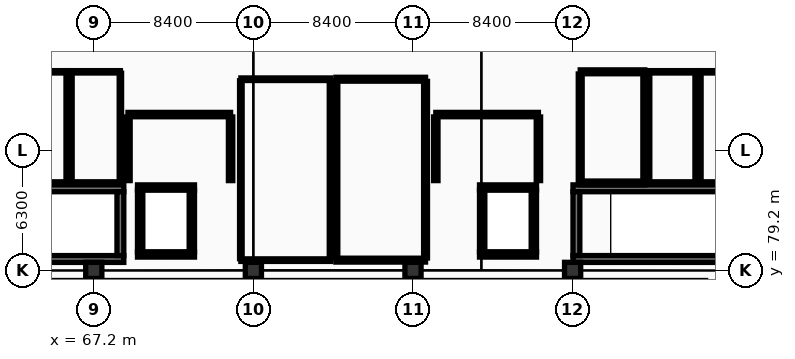
"""IFC4 building model, lengths in metres.
Left out: names, types, materials, properties, quantities, classifications, styles, units other than length and angle.
Written with IfcOpenShell. Run it as: python <this file> out.ifc"""

import sys

from ifc_helpers import new_model, si_unit, direction, frame, frame_2d, origin, origin_2d, place, context, subcontext, project, spatial, rectangle, extrude, element, fill, save


model = new_model("IFC4")
c1 = context("Model", 3, precision=1e-05, world=origin(), true_north=direction((0.0, 1.0)))
c2 = subcontext(c1, "Body", "Model", "MODEL_VIEW")
j1 = project(units=[si_unit("LENGTHUNIT", "METRE"), si_unit("PLANEANGLEUNIT", "RADIAN")], contexts=[c1])
p1 = place(None, origin())
s1 = spatial("IfcSite", under=j1, at=p1, CompositionType="ELEMENT")
p2 = place(p1, origin())
s2 = spatial("IfcBuilding", under=s1, at=p2, CompositionType="ELEMENT")
p3 = place(p2, origin())
s3 = spatial("IfcBuildingStorey", under=s2, at=p3, CompositionType="ELEMENT", Elevation=0.0)
for number, where, z_axis, x_axis in (
    (1, (67.2, 79.2, 0.0), (0.0, 0.0, 1.0), (1.0, 0.0, 0.0)),
    (2, (75.6, 79.2, 0.0), (0.0, 0.0, 1.0), (1.0, 0.0, 0.0)),
    (3, (84.0, 79.2, 0.0), (0.0, 0.0, 1.0), (1.0, 0.0, 0.0)),
    (4, (92.4, 79.2, 0.0), (0.0, 0.0, 1.0), (1.0, 0.0, 0.0)),
):
    element("IfcColumn", number, at=place(p3, frame(where, z_axis=z_axis, x_axis=x_axis)), inside=s3, PredefinedType="COLUMN", context=c2, shape_type="SweptSolid", body=[
        extrude(rectangle(XDim=0.85, YDim=0.85, at=origin_2d()), origin(), (0.0, 0.0, 1.0), 5.4),
    ])
for number, where, z_axis, x_axis in (
    (5, (59.42, 83.52, 0.0), (0.0, 0.0, 1.0), (1.0, 0.0, 0.0)),
    (6, (68.78, 79.8, 0.0), (0.0, 0.0, 1.0), (-1.0, 0.0, 0.0)),
):
    element("IfcWall", number, at=place(p3, frame(where, z_axis=z_axis, x_axis=x_axis)), inside=s3, PredefinedType="SHEAR", context=c2, shape_type="SweptSolid", body=[
        extrude(rectangle(XDim=9.36, YDim=0.36, at=frame_2d((4.68, 0.0))), origin(), (0.0, 0.0, 1.0), 5.14),
    ])
p4 = place(p3, frame((68.6, 83.34, 0.0), z_axis=(0.0, 0.0, 1.0), x_axis=(0.0, -1.0, 0.0)))
e7 = element("IfcWall", 7, at=p4, inside=s3, PredefinedType="SHEAR", context=c2, shape_type="SweptSolid", body=[
    extrude(rectangle(XDim=3.36, YDim=0.36, at=frame_2d((1.68, 0.0))), origin(), (0.0, 0.0, 1.0), 5.14),
])
for number, where, z_axis, x_axis in (
    (8, (92.42, 83.52, 0.0), (0.0, 0.0, 1.0), (1.0, 0.0, 0.0)),
    (9, (101.78, 79.8, 0.0), (0.0, 0.0, 1.0), (-1.0, 0.0, 0.0)),
):
    element("IfcWall", number, at=place(p3, frame(where, z_axis=z_axis, x_axis=x_axis)), inside=s3, PredefinedType="SHEAR", context=c2, shape_type="SweptSolid", body=[
        extrude(rectangle(XDim=9.36, YDim=0.36, at=frame_2d((4.68, 0.0))), origin(), (0.0, 0.0, 1.0), 5.14),
    ])
p5 = place(p3, frame((92.6, 79.98, 0.0), z_axis=(0.0, 0.0, 1.0), x_axis=(0.0, 1.0, 0.0)))
e10 = element("IfcWall", 10, at=p5, inside=s3, PredefinedType="SHEAR", context=c2, shape_type="SweptSolid", body=[
    extrude(rectangle(XDim=3.36, YDim=0.36, at=frame_2d((1.68, 0.0))), origin(), (0.0, 0.0, 1.0), 5.14),
])
p6 = place(p5, frame((1.08, 0.0, 0.0)))
e11 = element("IfcOpeningElement", 11, at=p6, cuts=e10, PredefinedType="OPENING", context=c2, shape_type="SweptSolid", body=[
    extrude(rectangle(XDim=1.2, YDim=2.2, at=frame_2d((0.6, 1.1))), frame((0.0, 0.19, 0.0), z_axis=(0.0, -1.0, 0.0), x_axis=(1.0, 0.0, 0.0)), (0.0, 0.0, 1.0), 0.38),
])
p7 = place(p3, frame((69.5, 83.56, 0.0), z_axis=(0.0, 0.0, 1.0), x_axis=(1.0, 0.0, 0.0)))
e12 = element("IfcWall", 12, at=p7, inside=s3, PredefinedType="SHEAR", context=c2, shape_type="SweptSolid", body=[
    extrude(rectangle(XDim=3.0, YDim=0.28, at=frame_2d((1.5, 0.0))), origin(), (0.0, 0.0, 1.0), 5.14),
])
p8 = place(p7, frame((0.95, 0.0, 0.0)))
e13 = element("IfcOpeningElement", 13, at=p8, cuts=e12, PredefinedType="OPENING", context=c2, shape_type="SweptSolid", body=[
    extrude(rectangle(XDim=1.1, YDim=2.2, at=frame_2d((0.55, 1.1))), frame((0.0, 0.15, 0.0), z_axis=(0.0, -1.0, 0.0), x_axis=(1.0, 0.0, 0.0)), (0.0, 0.0, 1.0), 0.3),
])
p9 = place(p3, frame((72.5, 80.04, 0.0), z_axis=(0.0, 0.0, 1.0), x_axis=(-1.0, 0.0, 0.0)))
e14 = element("IfcWall", 14, at=p9, inside=s3, PredefinedType="SHEAR", context=c2, shape_type="SweptSolid", body=[
    extrude(rectangle(XDim=3.0, YDim=0.28, at=frame_2d((1.5, 0.0))), origin(), (0.0, 0.0, 1.0), 5.14),
])
for number, where, z_axis, x_axis in (
    (15, (69.64, 80.18, 0.0), (0.0, 0.0, 1.0), (0.0, 1.0, 0.0)),
    (16, (72.36, 83.42, 0.0), (0.0, 0.0, 1.0), (0.0, -1.0, 0.0)),
):
    element("IfcWall", number, at=place(p3, frame(where, z_axis=z_axis, x_axis=x_axis)), inside=s3, PredefinedType="SHEAR", context=c2, shape_type="SweptSolid", body=[
        extrude(rectangle(XDim=3.24, YDim=0.28, at=frame_2d((1.62, 0.0))), origin(), (0.0, 0.0, 1.0), 5.14),
    ])
p10 = place(p3, frame((87.5, 83.56, 0.0), z_axis=(0.0, 0.0, 1.0), x_axis=(1.0, 0.0, 0.0)))
e17 = element("IfcWall", 17, at=p10, inside=s3, PredefinedType="SHEAR", context=c2, shape_type="SweptSolid", body=[
    extrude(rectangle(XDim=3.0, YDim=0.28, at=frame_2d((1.5, 0.0))), origin(), (0.0, 0.0, 1.0), 5.14),
])
p11 = place(p10, frame((0.95, 0.0, 0.0)))
e18 = element("IfcOpeningElement", 18, at=p11, cuts=e17, PredefinedType="OPENING", context=c2, shape_type="SweptSolid", body=[
    extrude(rectangle(XDim=1.1, YDim=2.2, at=frame_2d((0.55, 1.1))), frame((0.0, 0.15, 0.0), z_axis=(0.0, -1.0, 0.0), x_axis=(1.0, 0.0, 0.0)), (0.0, 0.0, 1.0), 0.3),
])
p12 = place(p3, frame((90.5, 80.04, 0.0), z_axis=(0.0, 0.0, 1.0), x_axis=(-1.0, 0.0, 0.0)))
e19 = element("IfcWall", 19, at=p12, inside=s3, PredefinedType="SHEAR", context=c2, shape_type="SweptSolid", body=[
    extrude(rectangle(XDim=3.0, YDim=0.28, at=frame_2d((1.5, 0.0))), origin(), (0.0, 0.0, 1.0), 5.14),
])
for number, where, z_axis, x_axis in (
    (20, (87.64, 80.18, 0.0), (0.0, 0.0, 1.0), (0.0, 1.0, 0.0)),
    (21, (90.36, 83.42, 0.0), (0.0, 0.0, 1.0), (0.0, -1.0, 0.0)),
):
    element("IfcWall", number, at=place(p3, frame(where, z_axis=z_axis, x_axis=x_axis)), inside=s3, PredefinedType="SHEAR", context=c2, shape_type="SweptSolid", body=[
        extrude(rectangle(XDim=3.24, YDim=0.28, at=frame_2d((1.62, 0.0))), origin(), (0.0, 0.0, 1.0), 5.14),
    ])
p13 = place(p3, frame((69.0, 87.4, 0.0), z_axis=(0.0, 0.0, 1.0), x_axis=(1.0, 0.0, 0.0)))
e22 = element("IfcWall", 22, at=p13, inside=s3, PredefinedType="STANDARD", context=c2, shape_type="SweptSolid", body=[
    extrude(rectangle(XDim=5.4, YDim=0.23, at=frame_2d((2.7, 0.0))), origin(), (0.0, 0.0, 1.0), 5.125),
])
p14 = place(p13, frame((2.05, 0.0, 0.0)))
e23 = element("IfcOpeningElement", 23, at=p14, cuts=e22, PredefinedType="OPENING", context=c2, shape_type="SweptSolid", body=[
    extrude(rectangle(XDim=1.3, YDim=2.2, at=frame_2d((0.65, 1.1))), frame((0.0, 0.125, 0.0), z_axis=(0.0, -1.0, 0.0), x_axis=(1.0, 0.0, 0.0)), (0.0, 0.0, 1.0), 0.25),
])
for number, where, z_axis, x_axis in (
    (24, (69.0, 83.925, 0.0), (0.0, 0.0, 1.0), (0.0, 1.0, 0.0)),
    (25, (74.4, 87.275, 0.0), (0.0, 0.0, 1.0), (0.0, -1.0, 0.0)),
):
    element("IfcWall", number, at=place(p3, frame(where, z_axis=z_axis, x_axis=x_axis)), inside=s3, PredefinedType="STANDARD", context=c2, shape_type="SweptSolid", body=[
        extrude(rectangle(XDim=3.35, YDim=0.23, at=frame_2d((1.675, 0.0))), origin(), (0.0, 0.0, 1.0), 5.125),
    ])
p15 = place(p3, frame((85.2, 87.4, 0.0), z_axis=(0.0, 0.0, 1.0), x_axis=(1.0, 0.0, 0.0)))
e26 = element("IfcWall", 26, at=p15, inside=s3, PredefinedType="STANDARD", context=c2, shape_type="SweptSolid", body=[
    extrude(rectangle(XDim=5.4, YDim=0.23, at=frame_2d((2.7, 0.0))), origin(), (0.0, 0.0, 1.0), 4.52),
])
p16 = place(p15, frame((2.05, 0.0, 0.0)))
e27 = element("IfcOpeningElement", 27, at=p16, cuts=e26, PredefinedType="OPENING", context=c2, shape_type="SweptSolid", body=[
    extrude(rectangle(XDim=1.3, YDim=2.2, at=frame_2d((0.65, 1.1))), frame((0.0, 0.125, 0.0), z_axis=(0.0, -1.0, 0.0), x_axis=(1.0, 0.0, 0.0)), (0.0, 0.0, 1.0), 0.25),
])
for number, where, z_axis, x_axis in (
    (28, (85.2, 83.925, 0.0), (0.0, 0.0, 1.0), (0.0, 1.0, 0.0)),
    (29, (90.6, 87.275, 0.0), (0.0, 0.0, 1.0), (0.0, -1.0, 0.0)),
):
    element("IfcWall", number, at=place(p3, frame(where, z_axis=z_axis, x_axis=x_axis)), inside=s3, PredefinedType="STANDARD", context=c2, shape_type="SweptSolid", body=[
        extrude(rectangle(XDim=3.35, YDim=0.23, at=frame_2d((1.675, 0.0))), origin(), (0.0, 0.0, 1.0), 4.52),
    ])
p17 = place(p3, frame((63.2, 89.65, 0.0), z_axis=(0.0, 0.0, 1.0), x_axis=(1.0, 0.0, 0.0)))
e30 = element("IfcWall", 30, at=p17, inside=s3, PredefinedType="PARTITIONING", context=c2, shape_type="SweptSolid", body=[
    extrude(rectangle(XDim=2.6, YDim=0.125, at=frame_2d((1.3, 0.0))), origin(), (0.0, 0.0, 1.0), 5.125),
])
p18 = place(p17, frame((0.85, 0.0, 0.0)))
e31 = element("IfcOpeningElement", 31, at=p18, cuts=e30, PredefinedType="OPENING", context=c2, shape_type="SweptSolid", body=[
    extrude(rectangle(XDim=0.9, YDim=2.1, at=frame_2d((0.45, 1.05))), frame((0.0, 0.073, 0.0), z_axis=(0.0, -1.0, 0.0), x_axis=(1.0, 0.0, 0.0)), (0.0, 0.0, 1.0), 0.145),
])
p19 = place(p3, frame((65.8, 83.8, 0.0), z_axis=(0.0, 0.0, 1.0), x_axis=(-1.0, 0.0, 0.0)))
e32 = element("IfcWall", 32, at=p19, inside=s3, PredefinedType="PARTITIONING", context=c2, shape_type="SweptSolid", body=[
    extrude(rectangle(XDim=2.6, YDim=0.125, at=frame_2d((1.3, 0.0))), origin(), (0.0, 0.0, 1.0), 5.125),
])
p20 = place(p3, frame((65.8, 89.577, 0.0), z_axis=(0.0, 0.0, 1.0), x_axis=(0.0, -1.0, 0.0)))
e33 = element("IfcWall", 33, at=p20, inside=s3, PredefinedType="PARTITIONING", context=c2, shape_type="SweptSolid", body=[
    extrude(rectangle(XDim=5.705, YDim=0.125, at=frame_2d((2.853, 0.0))), origin(), (0.0, 0.0, 1.0), 5.125),
])
p21 = place(p3, frame((66.0, 89.65, 0.0), z_axis=(0.0, 0.0, 1.0), x_axis=(1.0, 0.0, 0.0)))
e34 = element("IfcWall", 34, at=p21, inside=s3, PredefinedType="PARTITIONING", context=c2, shape_type="SweptSolid", body=[
    extrude(rectangle(XDim=2.6, YDim=0.125, at=frame_2d((1.3, 0.0))), origin(), (0.0, 0.0, 1.0), 4.27),
])
p22 = place(p21, frame((0.8, 0.0, 0.0)))
e35 = element("IfcOpeningElement", 35, at=p22, cuts=e34, PredefinedType="OPENING", context=c2, shape_type="SweptSolid", body=[
    extrude(rectangle(XDim=1.0, YDim=2.1, at=frame_2d((0.5, 1.05))), frame((0.0, 0.073, 0.0), z_axis=(0.0, -1.0, 0.0), x_axis=(1.0, 0.0, 0.0)), (0.0, 0.0, 1.0), 0.145),
])
p23 = place(p3, frame((68.6, 83.8, 0.0), z_axis=(0.0, 0.0, 1.0), x_axis=(-1.0, 0.0, 0.0)))
e36 = element("IfcWall", 36, at=p23, inside=s3, PredefinedType="PARTITIONING", context=c2, shape_type="SweptSolid", body=[
    extrude(rectangle(XDim=2.6, YDim=0.125, at=frame_2d((1.3, 0.0))), origin(), (0.0, 0.0, 1.0), 4.27),
])
for number, where, z_axis, x_axis in (
    (37, (66.0, 83.873, 0.0), (0.0, 0.0, 1.0), (0.0, 1.0, 0.0)),
    (38, (68.6, 89.577, 0.0), (0.0, 0.0, 1.0), (0.0, -1.0, 0.0)),
):
    element("IfcWall", number, at=place(p3, frame(where, z_axis=z_axis, x_axis=x_axis)), inside=s3, PredefinedType="PARTITIONING", context=c2, shape_type="SweptSolid", body=[
        extrude(rectangle(XDim=5.705, YDim=0.125, at=frame_2d((2.853, 0.0))), origin(), (0.0, 0.0, 1.0), 5.125),
    ])
p24 = place(p3, frame((96.4, 89.65, 0.0), z_axis=(0.0, 0.0, 1.0), x_axis=(1.0, 0.0, 0.0)))
e39 = element("IfcWall", 39, at=p24, inside=s3, PredefinedType="PARTITIONING", context=c2, shape_type="SweptSolid", body=[
    extrude(rectangle(XDim=2.5, YDim=0.125, at=frame_2d((1.25, 0.0))), origin(), (0.0, 0.0, 1.0), 5.125),
])
p25 = place(p24, frame((0.8, 0.0, 0.0)))
e40 = element("IfcOpeningElement", 40, at=p25, cuts=e39, PredefinedType="OPENING", context=c2, shape_type="SweptSolid", body=[
    extrude(rectangle(XDim=0.9, YDim=2.1, at=frame_2d((0.45, 1.05))), frame((0.0, 0.073, 0.0), z_axis=(0.0, -1.0, 0.0), x_axis=(1.0, 0.0, 0.0)), (0.0, 0.0, 1.0), 0.145),
])
p26 = place(p3, frame((98.9, 83.8, 0.0), z_axis=(0.0, 0.0, 1.0), x_axis=(-1.0, 0.0, 0.0)))
e41 = element("IfcWall", 41, at=p26, inside=s3, PredefinedType="PARTITIONING", context=c2, shape_type="SweptSolid", body=[
    extrude(rectangle(XDim=2.5, YDim=0.125, at=frame_2d((1.25, 0.0))), origin(), (0.0, 0.0, 1.0), 5.125),
])
for number, where, z_axis, x_axis in (
    (42, (96.4, 83.873, 0.0), (0.0, 0.0, 1.0), (0.0, 1.0, 0.0)),
    (43, (98.9, 89.577, 0.0), (0.0, 0.0, 1.0), (0.0, -1.0, 0.0)),
):
    element("IfcWall", number, at=place(p3, frame(where, z_axis=z_axis, x_axis=x_axis)), inside=s3, PredefinedType="PARTITIONING", context=c2, shape_type="SweptSolid", body=[
        extrude(rectangle(XDim=5.705, YDim=0.125, at=frame_2d((2.853, 0.0))), origin(), (0.0, 0.0, 1.0), 4.52),
    ])
p27 = place(p3, frame((99.1, 89.65, 0.0), z_axis=(0.0, 0.0, 1.0), x_axis=(1.0, 0.0, 0.0)))
e44 = element("IfcWall", 44, at=p27, inside=s3, PredefinedType="PARTITIONING", context=c2, shape_type="SweptSolid", body=[
    extrude(rectangle(XDim=2.5, YDim=0.125, at=frame_2d((1.25, 0.0))), origin(), (0.0, 0.0, 1.0), 4.27),
])
p28 = place(p27, frame((0.75, 0.0, 0.0)))
e45 = element("IfcOpeningElement", 45, at=p28, cuts=e44, PredefinedType="OPENING", context=c2, shape_type="SweptSolid", body=[
    extrude(rectangle(XDim=1.0, YDim=2.1, at=frame_2d((0.5, 1.05))), frame((0.0, 0.073, 0.0), z_axis=(0.0, -1.0, 0.0), x_axis=(1.0, 0.0, 0.0)), (0.0, 0.0, 1.0), 0.145),
])
p29 = place(p3, frame((101.6, 83.8, 0.0), z_axis=(0.0, 0.0, 1.0), x_axis=(-1.0, 0.0, 0.0)))
e46 = element("IfcWall", 46, at=p29, inside=s3, PredefinedType="PARTITIONING", context=c2, shape_type="SweptSolid", body=[
    extrude(rectangle(XDim=2.5, YDim=0.125, at=frame_2d((1.25, 0.0))), origin(), (0.0, 0.0, 1.0), 4.27),
])
p30 = place(p3, frame((99.1, 83.873, 0.0), z_axis=(0.0, 0.0, 1.0), x_axis=(0.0, 1.0, 0.0)))
e47 = element("IfcWall", 47, at=p30, inside=s3, PredefinedType="PARTITIONING", context=c2, shape_type="SweptSolid", body=[
    extrude(rectangle(XDim=5.705, YDim=0.125, at=frame_2d((2.853, 0.0))), origin(), (0.0, 0.0, 1.0), 4.52),
])
p31 = place(p3, frame((92.8, 89.65, 0.0), z_axis=(0.0, 0.0, 1.0), x_axis=(1.0, 0.0, 0.0)))
e48 = element("IfcWall", 48, at=p31, inside=s3, PredefinedType="STANDARD", context=c2, shape_type="SweptSolid", body=[
    extrude(rectangle(XDim=3.4, YDim=0.205, at=frame_2d((1.7, 0.0))), origin(), (0.0, 0.0, 1.0), 4.27),
])
p32 = place(p31, frame((1.0, 0.0, 0.0)))
e49 = element("IfcOpeningElement", 49, at=p32, cuts=e48, PredefinedType="OPENING", context=c2, shape_type="SweptSolid", body=[
    extrude(rectangle(XDim=1.4, YDim=2.25, at=frame_2d((0.7, 1.125))), frame((0.0, 0.113, 0.0), z_axis=(0.0, -1.0, 0.0), x_axis=(1.0, 0.0, 0.0)), (0.0, 0.0, 1.0), 0.225),
])
p33 = place(p3, frame((96.2, 83.8, 0.0), z_axis=(0.0, 0.0, 1.0), x_axis=(-1.0, 0.0, 0.0)))
e50 = element("IfcWall", 50, at=p33, inside=s3, PredefinedType="STANDARD", context=c2, shape_type="SweptSolid", body=[
    extrude(rectangle(XDim=3.4, YDim=0.205, at=frame_2d((1.7, 0.0))), origin(), (0.0, 0.0, 1.0), 4.27),
])
p34 = place(p3, frame((92.8, 83.913, 0.0), z_axis=(0.0, 0.0, 1.0), x_axis=(0.0, 1.0, 0.0)))
e51 = element("IfcWall", 51, at=p34, inside=s3, PredefinedType="STANDARD", context=c2, shape_type="SweptSolid", body=[
    extrude(rectangle(XDim=5.625, YDim=0.205, at=frame_2d((2.812, 0.0))), origin(), (0.0, 0.0, 1.0), 4.27),
])
p35 = place(p3, frame((96.2, 89.538, 0.0), z_axis=(0.0, 0.0, 1.0), x_axis=(0.0, -1.0, 0.0)))
e52 = element("IfcWall", 52, at=p35, inside=s3, PredefinedType="STANDARD", context=c2, shape_type="SweptSolid", body=[
    extrude(rectangle(XDim=5.625, YDim=0.205, at=frame_2d((2.812, 0.0))), origin(), (0.0, 0.0, 1.0), 4.52),
])
p36 = place(p3, frame((74.94, 89.26, 0.0), z_axis=(0.0, 0.0, 1.0), x_axis=(1.0, 0.0, 0.0)))
e53 = element("IfcWall", 53, at=p36, inside=s3, PredefinedType="PARTITIONING", context=c2, shape_type="SweptSolid", body=[
    extrude(rectangle(XDim=4.72, YDim=0.135, at=frame_2d((2.36, 0.0))), origin(), (0.0, 0.0, 1.0), 4.27),
])
p37 = place(p36, frame((2.192, 0.0, 0.0)))
e54 = element("IfcOpeningElement", 54, at=p37, cuts=e53, PredefinedType="OPENING", context=c2, shape_type="SweptSolid", body=[
    extrude(rectangle(XDim=0.95, YDim=2.15, at=frame_2d((0.475, 1.075))), frame((0.0, 0.077, 0.0), z_axis=(0.0, -1.0, 0.0), x_axis=(1.0, 0.0, 0.0)), (0.0, 0.0, 1.0), 0.155),
])
p38 = place(p3, frame((79.66, 79.74, 0.0), z_axis=(0.0, 0.0, 1.0), x_axis=(-1.0, 0.0, 0.0)))
e55 = element("IfcWall", 55, at=p38, inside=s3, PredefinedType="PARTITIONING", context=c2, shape_type="SweptSolid", body=[
    extrude(rectangle(XDim=4.72, YDim=0.135, at=frame_2d((2.36, 0.0))), origin(), (0.0, 0.0, 1.0), 4.27),
])
p39 = place(p3, frame((74.94, 79.817, 0.0), z_axis=(0.0, 0.0, 1.0), x_axis=(0.0, 1.0, 0.0)))
e56 = element("IfcWall", 56, at=p39, inside=s3, PredefinedType="PARTITIONING", context=c2, shape_type="SweptSolid", body=[
    extrude(rectangle(XDim=9.365, YDim=0.135, at=frame_2d((4.683, 0.0))), origin(), (0.0, 0.0, 1.0), 5.125),
])
p40 = place(p3, frame((79.66, 89.183, 0.0), z_axis=(0.0, 0.0, 1.0), x_axis=(0.0, -1.0, 0.0)))
e57 = element("IfcWall", 57, at=p40, inside=s3, PredefinedType="PARTITIONING", context=c2, shape_type="SweptSolid", body=[
    extrude(rectangle(XDim=9.365, YDim=0.135, at=frame_2d((4.683, 0.0))), origin(), (0.0, 0.0, 1.0), 4.52),
])
p41 = place(p3, frame((79.94, 89.26, 0.0), z_axis=(0.0, 0.0, 1.0), x_axis=(1.0, 0.0, 0.0)))
e58 = element("IfcWall", 58, at=p41, inside=s3, PredefinedType="STANDARD", context=c2, shape_type="SweptSolid", body=[
    extrude(rectangle(XDim=4.72, YDim=0.205, at=frame_2d((2.36, 0.0))), origin(), (0.0, 0.0, 1.0), 4.27),
])
p42 = place(p41, frame((1.398, 0.0, 0.0)))
e59 = element("IfcOpeningElement", 59, at=p42, cuts=e58, PredefinedType="OPENING", context=c2, shape_type="SweptSolid", body=[
    extrude(rectangle(XDim=1.4, YDim=2.25, at=frame_2d((0.7, 1.125))), frame((0.0, 0.113, 0.0), z_axis=(0.0, -1.0, 0.0), x_axis=(1.0, 0.0, 0.0)), (0.0, 0.0, 1.0), 0.225),
])
p43 = place(p3, frame((84.66, 79.74, 0.0), z_axis=(0.0, 0.0, 1.0), x_axis=(-1.0, 0.0, 0.0)))
e60 = element("IfcWall", 60, at=p43, inside=s3, PredefinedType="STANDARD", context=c2, shape_type="SweptSolid", body=[
    extrude(rectangle(XDim=4.72, YDim=0.205, at=frame_2d((2.36, 0.0))), origin(), (0.0, 0.0, 1.0), 4.27),
])
for number, where, z_axis, x_axis in (
    (61, (79.94, 79.853, 0.0), (0.0, 0.0, 1.0), (0.0, 1.0, 0.0)),
    (62, (84.66, 89.147, 0.0), (0.0, 0.0, 1.0), (0.0, -1.0, 0.0)),
):
    element("IfcWall", number, at=place(p3, frame(where, z_axis=z_axis, x_axis=x_axis)), inside=s3, PredefinedType="STANDARD", context=c2, shape_type="SweptSolid", body=[
        extrude(rectangle(XDim=9.295, YDim=0.205, at=frame_2d((4.647, 0.0))), origin(), (0.0, 0.0, 1.0), 4.52),
    ])
p44 = place(p6, origin())
e63 = element("IfcDoor", 63, at=p44, inside=s3, OperationType="SINGLE_SWING_LEFT", PredefinedType="DOOR", context=c2, shape_type="SweptSolid", body=[
    extrude(rectangle(XDim=1.2, YDim=2.2, at=frame_2d((0.6, 1.1))), frame((0.0, 0.025, 0.0), z_axis=(0.0, -1.0, 0.0), x_axis=(1.0, 0.0, 0.0)), (0.0, 0.0, 1.0), 0.05),
])
fill(e11, e63)
p45 = place(p8, origin())
e64 = element("IfcDoor", 64, at=p45, inside=s3, OperationType="DOUBLE_DOOR_SLIDING", PredefinedType="DOOR", context=c2, shape_type="SweptSolid", body=[
    extrude(rectangle(XDim=1.1, YDim=2.2, at=frame_2d((0.55, 1.1))), frame((0.0, 0.025, 0.0), z_axis=(0.0, -1.0, 0.0), x_axis=(1.0, 0.0, 0.0)), (0.0, 0.0, 1.0), 0.05),
])
fill(e13, e64)
p46 = place(p11, origin())
e65 = element("IfcDoor", 65, at=p46, inside=s3, OperationType="DOUBLE_DOOR_SLIDING", PredefinedType="DOOR", context=c2, shape_type="SweptSolid", body=[
    extrude(rectangle(XDim=1.1, YDim=2.2, at=frame_2d((0.55, 1.1))), frame((0.0, 0.025, 0.0), z_axis=(0.0, -1.0, 0.0), x_axis=(1.0, 0.0, 0.0)), (0.0, 0.0, 1.0), 0.05),
])
fill(e18, e65)
p47 = place(p14, origin())
e66 = element("IfcDoor", 66, at=p47, inside=s3, OperationType="SINGLE_SWING_RIGHT", PredefinedType="DOOR", context=c2, shape_type="SweptSolid", body=[
    extrude(rectangle(XDim=1.3, YDim=2.2, at=frame_2d((0.65, 1.1))), frame((0.0, 0.025, 0.0), z_axis=(0.0, -1.0, 0.0), x_axis=(1.0, 0.0, 0.0)), (0.0, 0.0, 1.0), 0.05),
])
fill(e23, e66)
p48 = place(p16, origin())
e67 = element("IfcDoor", 67, at=p48, inside=s3, OperationType="SINGLE_SWING_LEFT", PredefinedType="DOOR", context=c2, shape_type="SweptSolid", body=[
    extrude(rectangle(XDim=1.3, YDim=2.2, at=frame_2d((0.65, 1.1))), frame((0.0, 0.025, 0.0), z_axis=(0.0, -1.0, 0.0), x_axis=(1.0, 0.0, 0.0)), (0.0, 0.0, 1.0), 0.05),
])
fill(e27, e67)
p49 = place(p22, origin())
e68 = element("IfcDoor", 68, at=p49, inside=s3, OperationType="SINGLE_SWING_LEFT", PredefinedType="DOOR", context=c2, shape_type="SweptSolid", body=[
    extrude(rectangle(XDim=1.0, YDim=2.1, at=frame_2d((0.5, 1.05))), frame((0.0, 0.025, 0.0), z_axis=(0.0, -1.0, 0.0), x_axis=(1.0, 0.0, 0.0)), (0.0, 0.0, 1.0), 0.05),
])
fill(e35, e68)
p50 = place(p25, origin())
e69 = element("IfcDoor", 69, at=p50, inside=s3, OperationType="SINGLE_SWING_RIGHT", PredefinedType="DOOR", context=c2, shape_type="SweptSolid", body=[
    extrude(rectangle(XDim=0.9, YDim=2.1, at=frame_2d((0.45, 1.05))), frame((0.0, 0.025, 0.0), z_axis=(0.0, -1.0, 0.0), x_axis=(1.0, 0.0, 0.0)), (0.0, 0.0, 1.0), 0.05),
])
fill(e40, e69)
p51 = place(p28, origin())
e70 = element("IfcDoor", 70, at=p51, inside=s3, OperationType="SINGLE_SWING_LEFT", PredefinedType="DOOR", context=c2, shape_type="SweptSolid", body=[
    extrude(rectangle(XDim=1.0, YDim=2.1, at=frame_2d((0.5, 1.05))), frame((0.0, 0.025, 0.0), z_axis=(0.0, -1.0, 0.0), x_axis=(1.0, 0.0, 0.0)), (0.0, 0.0, 1.0), 0.05),
])
fill(e45, e70)
p52 = place(p32, origin())
e71 = element("IfcDoor", 71, at=p52, inside=s3, OperationType="SINGLE_SWING_LEFT", PredefinedType="DOOR", context=c2, shape_type="SweptSolid", body=[
    extrude(rectangle(XDim=1.4, YDim=2.25, at=frame_2d((0.7, 1.125))), frame((0.0, 0.025, 0.0), z_axis=(0.0, -1.0, 0.0), x_axis=(1.0, 0.0, 0.0)), (0.0, 0.0, 1.0), 0.05),
])
fill(e49, e71)
p53 = place(p37, origin())
e72 = element("IfcDoor", 72, at=p53, inside=s3, OperationType="SINGLE_SWING_LEFT", PredefinedType="DOOR", context=c2, shape_type="SweptSolid", body=[
    extrude(rectangle(XDim=0.95, YDim=2.15, at=frame_2d((0.475, 1.075))), frame((0.0, 0.025, 0.0), z_axis=(0.0, -1.0, 0.0), x_axis=(1.0, 0.0, 0.0)), (0.0, 0.0, 1.0), 0.05),
])
fill(e54, e72)
p54 = place(p42, origin())
e73 = element("IfcDoor", 73, at=p54, inside=s3, OperationType="SINGLE_SWING_RIGHT", PredefinedType="DOOR", context=c2, shape_type="SweptSolid", body=[
    extrude(rectangle(XDim=1.4, YDim=2.25, at=frame_2d((0.7, 1.125))), frame((0.0, 0.025, 0.0), z_axis=(0.0, -1.0, 0.0), x_axis=(1.0, 0.0, 0.0)), (0.0, 0.0, 1.0), 0.05),
])
fill(e59, e73)
save(model, sys.argv[1])
